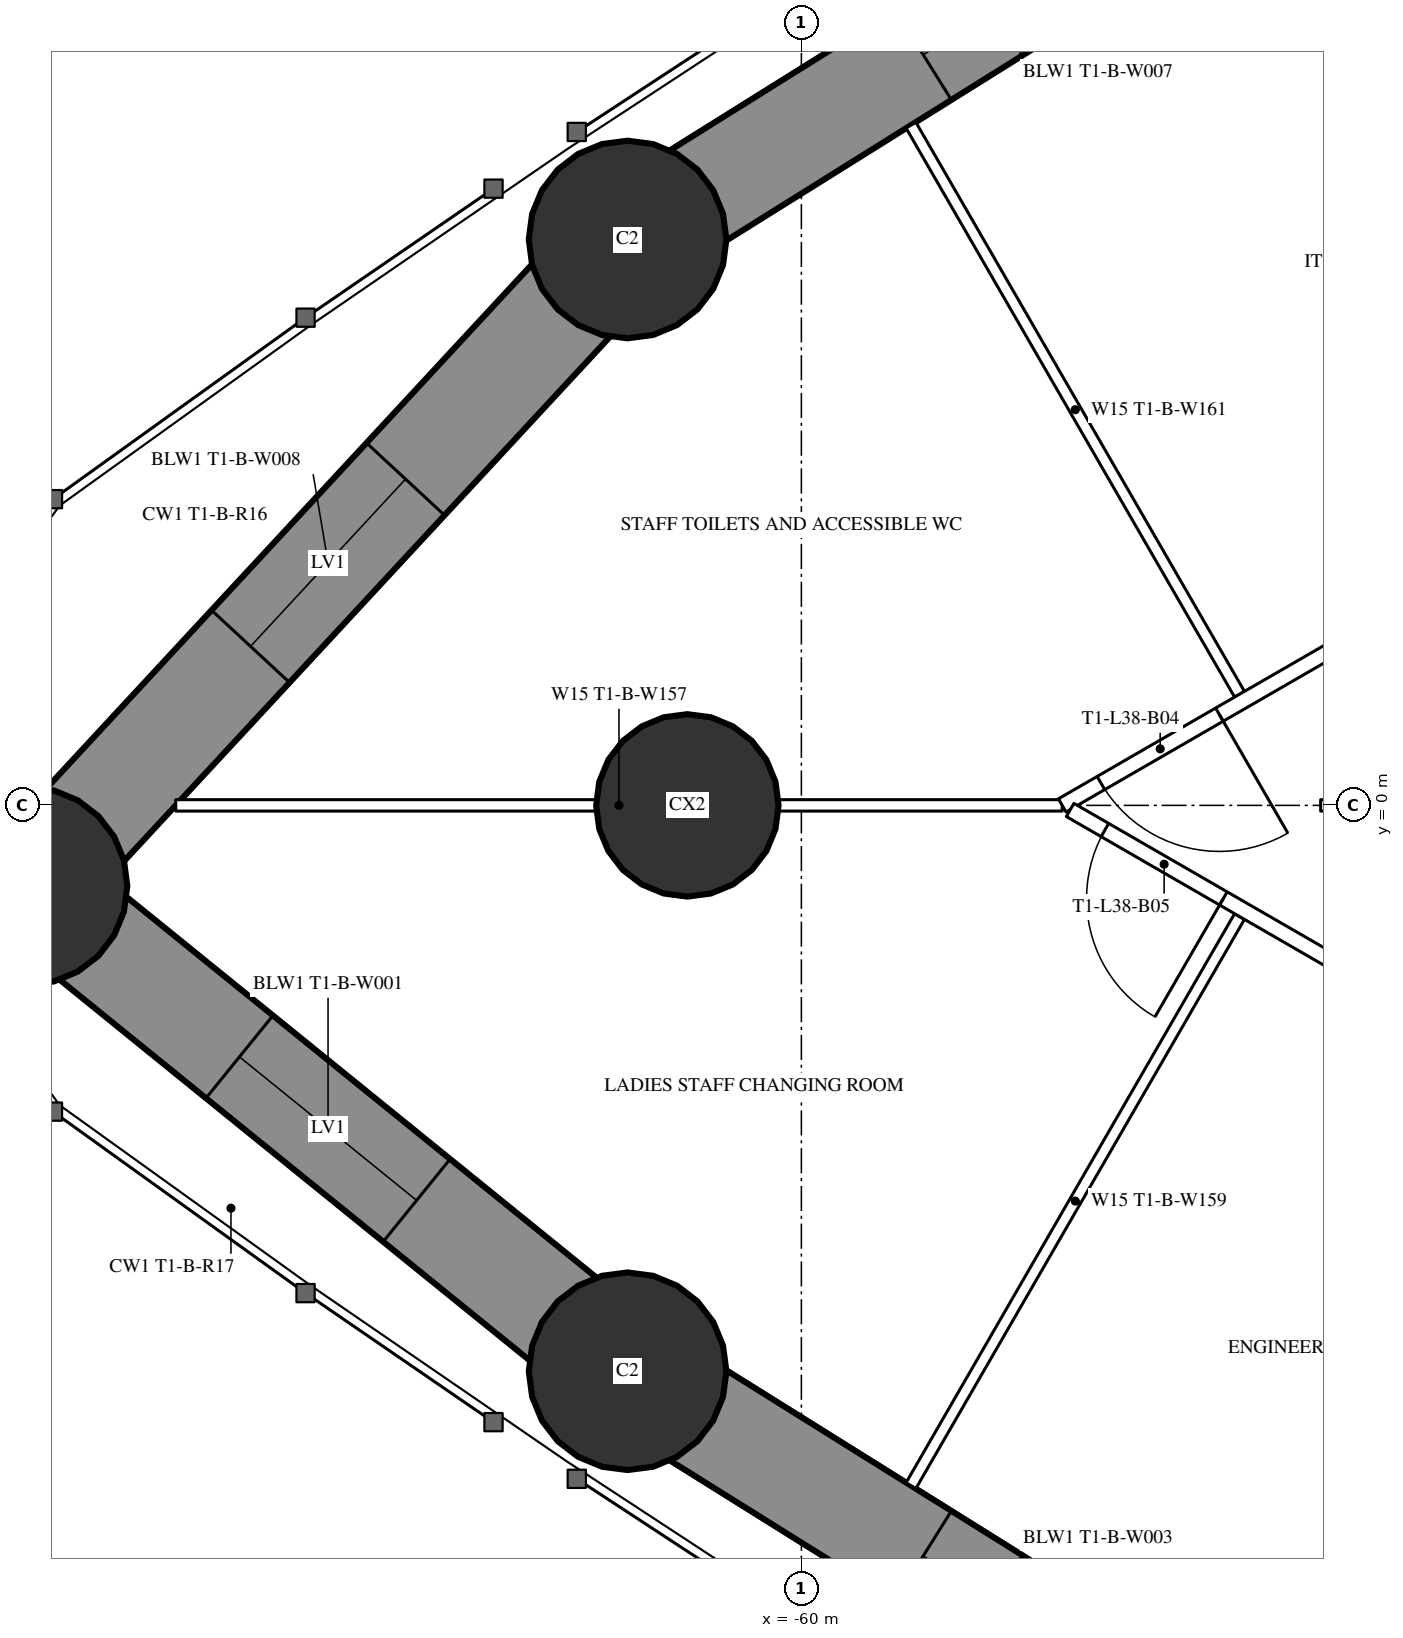
"""IFC4 building model, lengths in metres.
Left out: names, types, materials, properties, quantities, classifications, styles, units other than length and angle.
Written with IfcOpenShell. Run it as: python <this file> out.ifc"""

import sys

from ifc_helpers import new_model, si_unit, direction, frame, frame_2d, origin, origin_2d, place, context, subcontext, project, spatial, rectangle, circle, hollow_circle, extrude, element, fill, save


model = new_model("IFC4")
c1 = context("Model", 3, precision=1e-05, world=origin(), true_north=direction((0.0, 1.0)))
c2 = subcontext(c1, "Body", "Model", "MODEL_VIEW")
j1 = project(units=[si_unit("LENGTHUNIT", "METRE"), si_unit("PLANEANGLEUNIT", "RADIAN")], contexts=[c1])
p1 = place(None, origin())
s1 = spatial("IfcSite", under=j1, at=p1, CompositionType="ELEMENT")
p2 = place(p1, origin())
s2 = spatial("IfcBuilding", under=s1, at=p2, CompositionType="ELEMENT")
p3 = place(p2, frame((0.0, 0.0, 143.1)))
s3 = spatial("IfcBuildingStorey", under=s2, at=p3, CompositionType="ELEMENT", Elevation=143.1)
for number, where, z_axis, x_axis in (
    (1, (-70.168, -1.06, 0.0), (0.0, 0.0, 1.0), (1.0, 0.0, 0.0)),
    (2, (-62.287, -7.445, 0.0), (0.0, 0.0, 1.0), (1.0, 0.0, 0.0)),
    (3, (-62.287, 7.445, 0.0), (0.0, 0.0, 1.0), (1.0, 0.0, 0.0)),
):
    element("IfcColumn", number, at=place(p3, frame(where, z_axis=z_axis, x_axis=x_axis)), inside=s3, PredefinedType="COLUMN", context=c2, shape_type="SweptSolid", body=[
        extrude(hollow_circle(Radius=1.3, WallThickness=0.1, at=origin_2d()), origin(), (0.0, 0.0, 1.0), 3.6),
    ])
p4 = place(p3, frame((-61.5, 0.0, 0.0), z_axis=(0.0, 0.0, 1.0), x_axis=(1.0, 0.0, 0.0)))
e4 = element("IfcColumn", 4, at=p4, inside=s3, PredefinedType="COLUMN", context=c2, shape_type="SweptSolid", body=[
    extrude(circle(Radius=1.2, at=origin_2d()), origin(), (0.0, 0.0, 1.0), 3.6),
])
p5 = place(p3, frame((-51.963, 13.895, 0.0), z_axis=(0.0, 0.0, 1.0), x_axis=(-0.848062521637, -0.529896177939, 0.0)))
e5 = element("IfcWall", 5, at=p5, inside=s3, PredefinedType="SHEAR", context=c2, shape_type="SweptSolid", body=[
    extrude(rectangle(XDim=12.173, YDim=1.4, at=frame_2d((6.086, 0.0))), origin(), (0.0, 0.0, 1.0), 3.6),
])
p6 = place(p5, frame((4.586, 0.0, 0.6)))
e6 = element("IfcOpeningElement", 6, at=p6, cuts=e5, PredefinedType="OPENING", context=c2, shape_type="SweptSolid", body=[
    extrude(rectangle(XDim=3.0, YDim=1.2, at=frame_2d((1.5, 0.6))), frame((0.0, 0.71, 0.0), z_axis=(0.0, -1.0, 0.0), x_axis=(1.0, 0.0, 0.0)), (0.0, 0.0, 1.0), 1.42),
])
p7 = place(p3, frame((-62.287, 7.445, 0.0), z_axis=(0.0, 0.0, 1.0), x_axis=(-0.679718253794, -0.733473309303, 0.0)))
e7 = element("IfcWall", 7, at=p7, inside=s3, PredefinedType="SHEAR", context=c2, shape_type="SweptSolid", body=[
    extrude(rectangle(XDim=11.595, YDim=1.4, at=frame_2d((5.797, 0.0))), origin(), (0.0, 0.0, 1.0), 3.6),
])
p8 = place(p7, frame((4.298, 0.0, 0.6)))
e8 = element("IfcOpeningElement", 8, at=p8, cuts=e7, PredefinedType="OPENING", context=c2, shape_type="SweptSolid", body=[
    extrude(rectangle(XDim=3.0, YDim=1.2, at=frame_2d((1.5, 0.6))), frame((0.0, 0.71, 0.0), z_axis=(0.0, -1.0, 0.0), x_axis=(1.0, 0.0, 0.0)), (0.0, 0.0, 1.0), 1.42),
])
p9 = place(p3, frame((-70.168, -1.06, 0.0), z_axis=(0.0, 0.0, 1.0), x_axis=(0.777033503891, -0.629459239213, 0.0)))
e9 = element("IfcWall", 9, at=p9, inside=s3, PredefinedType="SHEAR", context=c2, shape_type="SweptSolid", body=[
    extrude(rectangle(XDim=10.143, YDim=1.4, at=frame_2d((5.071, 0.0))), origin(), (0.0, 0.0, 1.0), 3.6),
])
p10 = place(p9, frame((3.572, 0.0, 0.6)))
e10 = element("IfcOpeningElement", 10, at=p10, cuts=e9, PredefinedType="OPENING", context=c2, shape_type="SweptSolid", body=[
    extrude(rectangle(XDim=3.0, YDim=1.2, at=frame_2d((1.5, 0.6))), frame((0.0, 0.71, 0.0), z_axis=(0.0, -1.0, 0.0), x_axis=(1.0, 0.0, 0.0)), (0.0, 0.0, 1.0), 1.42),
])
p11 = place(p3, frame((-62.287, -7.445, 0.0), z_axis=(0.0, 0.0, 1.0), x_axis=(0.848062521637, -0.529896177939, 0.0)))
e11 = element("IfcWall", 11, at=p11, inside=s3, PredefinedType="SHEAR", context=c2, shape_type="SweptSolid", body=[
    extrude(rectangle(XDim=12.173, YDim=1.4, at=frame_2d((6.086, 0.0))), origin(), (0.0, 0.0, 1.0), 3.6),
])
p12 = place(p11, frame((4.586, 0.0, 0.6)))
e12 = element("IfcOpeningElement", 12, at=p12, cuts=e11, PredefinedType="OPENING", context=c2, shape_type="SweptSolid", body=[
    extrude(rectangle(XDim=3.0, YDim=1.2, at=frame_2d((1.5, 0.6))), frame((0.0, 0.71, 0.0), z_axis=(0.0, -1.0, 0.0), x_axis=(1.0, 0.0, 0.0)), (0.0, 0.0, 1.0), 1.42),
])
for number, where, z_axis, x_axis in (
    (13, (-54.236, 1.462, 0.0), (0.0, 0.0, 1.0), (-0.5, 0.866, 0.0)),
    (14, (-54.236, -1.462, 0.0), (0.0, 0.0, 1.0), (-0.5, -0.866, 0.0)),
):
    element("IfcWall", number, at=place(p3, frame(where, z_axis=z_axis, x_axis=x_axis)), inside=s3, PredefinedType="PARTITIONING", context=c2, shape_type="SweptSolid", body=[
        extrude(rectangle(XDim=8.645, YDim=0.15, at=frame_2d((4.323, 0.0))), origin(), (0.0, 0.0, 1.0), 3.35),
    ])
p13 = place(p3, frame((-56.568, 0.0, 0.0), z_axis=(0.0, 0.0, 1.0), x_axis=(-1.0, 0.0, 0.0)))
e15 = element("IfcWall", 15, at=p13, inside=s3, PredefinedType="PARTITIONING", context=c2, shape_type="SweptSolid", body=[
    extrude(rectangle(XDim=11.663, YDim=0.15, at=frame_2d((5.832, 0.0))), origin(), (0.0, 0.0, 1.0), 2.15),
])
p14 = place(p3, frame((-37.7, 10.894, 0.0), z_axis=(0.0, 0.0, 1.0), x_axis=(-0.866027905338, -0.499995667157, 0.0)))
e16 = element("IfcWall", 16, at=p14, inside=s3, PredefinedType="PARTITIONING", context=c2, shape_type="SweptSolid", body=[
    extrude(rectangle(XDim=21.787, YDim=0.2, at=frame_2d((10.894, 0.0))), origin(), (0.0, 0.0, 1.0), 3.35),
])
p15 = place(p14, frame((14.296, 0.0, 0.0)))
e17 = element("IfcOpeningElement", 17, at=p15, cuts=e16, PredefinedType="OPENING", context=c2, shape_type="SweptSolid", body=[
    extrude(rectangle(XDim=1.8, YDim=2.2, at=frame_2d((0.9, 1.1))), frame((0.0, 0.11, 0.0), z_axis=(0.0, -1.0, 0.0), x_axis=(1.0, 0.0, 0.0)), (0.0, 0.0, 1.0), 0.22),
])
p16 = place(p14, frame((19.399, 0.0, 0.0)))
e18 = element("IfcOpeningElement", 18, at=p16, cuts=e16, PredefinedType="OPENING", context=c2, shape_type="SweptSolid", body=[
    extrude(rectangle(XDim=1.8, YDim=2.14, at=frame_2d((0.9, 1.07))), frame((0.0, 0.11, 0.0), z_axis=(0.0, -1.0, 0.0), x_axis=(1.0, 0.0, 0.0)), (0.0, 0.0, 1.0), 0.22),
])
p17 = place(p14, frame((4.64, 0.0, 0.0)))
e19 = element("IfcOpeningElement", 19, at=p17, cuts=e16, PredefinedType="OPENING", context=c2, shape_type="SweptSolid", body=[
    extrude(rectangle(XDim=1.8, YDim=2.2, at=frame_2d((0.9, 1.1))), frame((0.0, 0.11, 0.0), z_axis=(0.0, -1.0, 0.0), x_axis=(1.0, 0.0, 0.0)), (0.0, 0.0, 1.0), 0.22),
])
p18 = place(p3, frame((-36.92, -11.344, 0.0), z_axis=(0.0, 0.0, 1.0), x_axis=(-0.866028313256, 0.499994960614, 0.0)))
e20 = element("IfcWall", 20, at=p18, inside=s3, PredefinedType="PARTITIONING", context=c2, shape_type="SweptSolid", body=[
    extrude(rectangle(XDim=22.568, YDim=0.2, at=frame_2d((11.284, 0.0))), origin(), (0.0, 0.0, 1.0), 3.35),
])
p19 = place(p18, frame((20.24, 0.0, 0.0)))
e21 = element("IfcOpeningElement", 21, at=p19, cuts=e20, PredefinedType="OPENING", context=c2, shape_type="SweptSolid", body=[
    extrude(rectangle(XDim=1.8, YDim=2.14, at=frame_2d((0.9, 1.07))), frame((0.0, 0.11, 0.0), z_axis=(0.0, -1.0, 0.0), x_axis=(1.0, 0.0, 0.0)), (0.0, 0.0, 1.0), 0.22),
])
p20 = place(p18, frame((14.946, 0.0, 0.0)))
e22 = element("IfcOpeningElement", 22, at=p20, cuts=e20, PredefinedType="OPENING", context=c2, shape_type="SweptSolid", body=[
    extrude(rectangle(XDim=1.8, YDim=2.2, at=frame_2d((0.9, 1.1))), frame((0.0, 0.11, 0.0), z_axis=(0.0, -1.0, 0.0), x_axis=(1.0, 0.0, 0.0)), (0.0, 0.0, 1.0), 0.22),
])
p21 = place(p18, frame((5.091, 0.0, 0.0)))
e23 = element("IfcOpeningElement", 23, at=p21, cuts=e20, PredefinedType="OPENING", context=c2, shape_type="SweptSolid", body=[
    extrude(rectangle(XDim=1.8, YDim=2.2, at=frame_2d((0.9, 1.1))), frame((0.0, 0.11, 0.0), z_axis=(0.0, -1.0, 0.0), x_axis=(1.0, 0.0, 0.0)), (0.0, 0.0, 1.0), 0.22),
])
p22 = place(p3, frame((-44.575, 0.0, 0.0), z_axis=(0.0, 0.0, 1.0), x_axis=(-1.0, 0.0, 0.0)))
e24 = element("IfcWall", 24, at=p22, inside=s3, PredefinedType="PARTITIONING", context=c2, shape_type="SweptSolid", body=[
    extrude(rectangle(XDim=8.593, YDim=0.15, at=frame_2d((4.297, 0.0))), origin(), (0.0, 0.0, 1.0), 2.15),
])
p23 = place(p6, origin())
e25 = element("IfcWindow", 25, at=p23, inside=s3, PartitioningType="SINGLE_PANEL", PredefinedType="WINDOW", context=c2, shape_type="SweptSolid", body=[
    extrude(rectangle(XDim=3.0, YDim=1.2, at=frame_2d((1.5, 0.6))), frame((0.0, 0.03, 0.0), z_axis=(0.0, -1.0, 0.0), x_axis=(1.0, 0.0, 0.0)), (0.0, 0.0, 1.0), 0.06),
])
fill(e6, e25)
p24 = place(p8, origin())
e26 = element("IfcWindow", 26, at=p24, inside=s3, PartitioningType="SINGLE_PANEL", PredefinedType="WINDOW", context=c2, shape_type="SweptSolid", body=[
    extrude(rectangle(XDim=3.0, YDim=1.2, at=frame_2d((1.5, 0.6))), frame((0.0, 0.03, 0.0), z_axis=(0.0, -1.0, 0.0), x_axis=(1.0, 0.0, 0.0)), (0.0, 0.0, 1.0), 0.06),
])
fill(e8, e26)
p25 = place(p10, origin())
e27 = element("IfcWindow", 27, at=p25, inside=s3, PartitioningType="SINGLE_PANEL", PredefinedType="WINDOW", context=c2, shape_type="SweptSolid", body=[
    extrude(rectangle(XDim=3.0, YDim=1.2, at=frame_2d((1.5, 0.6))), frame((0.0, 0.03, 0.0), z_axis=(0.0, -1.0, 0.0), x_axis=(1.0, 0.0, 0.0)), (0.0, 0.0, 1.0), 0.06),
])
fill(e10, e27)
p26 = place(p12, origin())
e28 = element("IfcWindow", 28, at=p26, inside=s3, PartitioningType="SINGLE_PANEL", PredefinedType="WINDOW", context=c2, shape_type="SweptSolid", body=[
    extrude(rectangle(XDim=3.0, YDim=1.2, at=frame_2d((1.5, 0.6))), frame((0.0, 0.03, 0.0), z_axis=(0.0, -1.0, 0.0), x_axis=(1.0, 0.0, 0.0)), (0.0, 0.0, 1.0), 0.06),
])
fill(e12, e28)
p27 = place(p16, origin())
e29 = element("IfcDoor", 29, at=p27, inside=s3, OperationType="DOUBLE_DOOR_SINGLE_SWING", PredefinedType="DOOR", context=c2, shape_type="SweptSolid", body=[
    extrude(rectangle(XDim=1.8, YDim=2.14, at=frame_2d((0.9, 1.07))), frame((0.0, 0.025, 0.0), z_axis=(0.0, -1.0, 0.0), x_axis=(1.0, 0.0, 0.0)), (0.0, 0.0, 1.0), 0.05),
])
fill(e18, e29)
p28 = place(p19, origin())
e30 = element("IfcDoor", 30, at=p28, inside=s3, OperationType="DOUBLE_DOOR_SINGLE_SWING", PredefinedType="DOOR", context=c2, shape_type="SweptSolid", body=[
    extrude(rectangle(XDim=1.8, YDim=2.14, at=frame_2d((0.9, 1.07))), frame((0.0, 0.025, 0.0), z_axis=(0.0, -1.0, 0.0), x_axis=(1.0, 0.0, 0.0)), (0.0, 0.0, 1.0), 0.05),
])
fill(e21, e30)
save(model, sys.argv[1])
